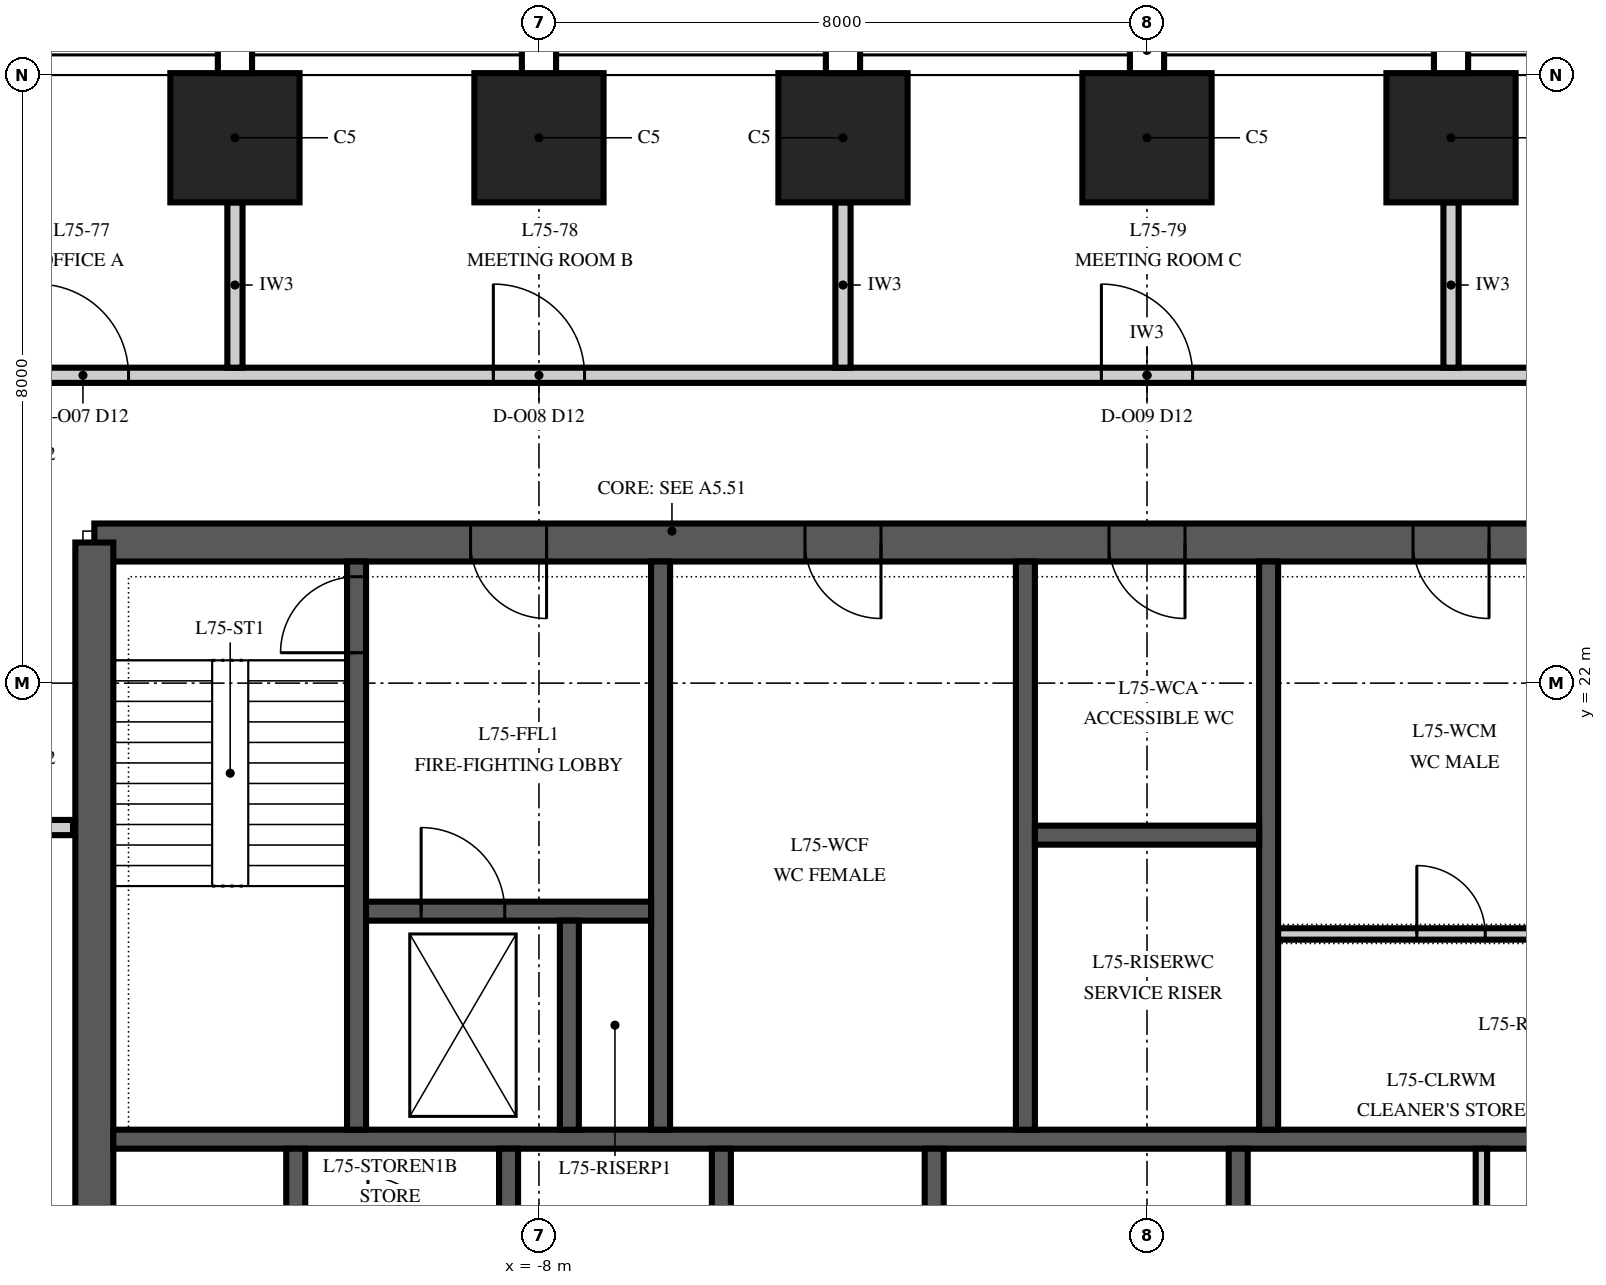
"""IFC4 building model, lengths in metres.
Left out: names, types, materials, properties, quantities, classifications, styles, units other than length and angle.
Written with IfcOpenShell. Run it as: python <this file> out.ifc"""

import sys

from ifc_helpers import new_model, si_unit, direction, frame, frame_2d, origin, origin_2d, place, context, subcontext, project, spatial, polyline, rectangle, outline, extrude, element, fill, save


model = new_model("IFC4")
c1 = context("Model", 3, precision=1e-05, world=origin(), true_north=direction((0.0, 1.0)))
c2 = subcontext(c1, "Body", "Model", "MODEL_VIEW")
j1 = project(units=[si_unit("LENGTHUNIT", "METRE"), si_unit("PLANEANGLEUNIT", "RADIAN")], contexts=[c1])
p1 = place(None, origin())
s1 = spatial("IfcSite", under=j1, at=p1, CompositionType="ELEMENT")
p2 = place(p1, origin())
s2 = spatial("IfcBuilding", under=s1, at=p2, CompositionType="ELEMENT")
p3 = place(p2, frame((0.0, 0.0, 320.0)))
s3 = spatial("IfcBuildingStorey", under=s2, at=p3, CompositionType="ELEMENT", Elevation=320.0)
for number, where, z_axis, x_axis in (
    (1, (4.0, 29.175, 0.0), (0.0, 0.0, 1.0), (-1.0, 0.0, 0.0)),
    (2, (0.0, 29.175, 0.0), (0.0, 0.0, 1.0), (-1.0, 0.0, 0.0)),
    (3, (-4.0, 29.175, 0.0), (0.0, 0.0, 1.0), (-1.0, 0.0, 0.0)),
    (4, (-8.0, 29.175, 0.0), (0.0, 0.0, 1.0), (-1.0, 0.0, 0.0)),
    (5, (-12.0, 29.175, 0.0), (0.0, 0.0, 1.0), (-1.0, 0.0, 0.0)),
):
    element("IfcColumn", number, at=place(p3, frame(where, z_axis=z_axis, x_axis=x_axis)), inside=s3, PredefinedType="COLUMN", context=c2, shape_type="SweptSolid", body=[
        extrude(rectangle(XDim=1.7, YDim=1.7, at=origin_2d()), origin(), (0.0, 0.0, 1.0), 4.0),
    ])
p4 = place(p3, frame((13.85, 23.85, 0.0), z_axis=(0.0, 0.0, 1.0), x_axis=(-1.0, 0.0, 0.0)))
e6 = element("IfcWall", 6, at=p4, inside=s3, PredefinedType="SHEAR", context=c2, shape_type="SweptSolid", body=[
    extrude(rectangle(XDim=27.7, YDim=0.5, at=frame_2d((13.85, 0.0))), origin(), (0.0, 0.0, 1.0), 4.0),
])
p5 = place(p4, frame((21.75, 0.0, 0.0)))
e7 = element("IfcOpeningElement", 7, at=p5, cuts=e6, PredefinedType="OPENING", context=c2, shape_type="SweptSolid", body=[
    extrude(rectangle(XDim=1.0, YDim=2.1, at=frame_2d((0.5, 1.05))), frame((0.0, 0.265, 0.0), z_axis=(0.0, -1.0, 0.0), x_axis=(1.0, 0.0, 0.0)), (0.0, 0.0, 1.0), 0.53),
])
p6 = place(p4, frame((4.95, 0.0, 0.0)))
e8 = element("IfcOpeningElement", 8, at=p6, cuts=e6, PredefinedType="OPENING", context=c2, shape_type="SweptSolid", body=[
    extrude(rectangle(XDim=1.0, YDim=2.1, at=frame_2d((0.5, 1.05))), frame((0.0, 0.265, 0.0), z_axis=(0.0, -1.0, 0.0), x_axis=(1.0, 0.0, 0.0)), (0.0, 0.0, 1.0), 0.53),
])
p7 = place(p4, frame((17.35, 0.0, 0.0)))
e9 = element("IfcOpeningElement", 9, at=p7, cuts=e6, PredefinedType="OPENING", context=c2, shape_type="SweptSolid", body=[
    extrude(rectangle(XDim=1.0, YDim=2.1, at=frame_2d((0.5, 1.05))), frame((0.0, 0.265, 0.0), z_axis=(0.0, -1.0, 0.0), x_axis=(1.0, 0.0, 0.0)), (0.0, 0.0, 1.0), 0.53),
])
p8 = place(p4, frame((13.35, 0.0, 0.0)))
e10 = element("IfcOpeningElement", 10, at=p8, cuts=e6, PredefinedType="OPENING", context=c2, shape_type="SweptSolid", body=[
    extrude(rectangle(XDim=1.0, YDim=2.1, at=frame_2d((0.5, 1.05))), frame((0.0, 0.265, 0.0), z_axis=(0.0, -1.0, 0.0), x_axis=(1.0, 0.0, 0.0)), (0.0, 0.0, 1.0), 0.53),
])
p9 = place(p4, frame((9.35, 0.0, 0.0)))
e11 = element("IfcOpeningElement", 11, at=p9, cuts=e6, PredefinedType="OPENING", context=c2, shape_type="SweptSolid", body=[
    extrude(rectangle(XDim=1.0, YDim=2.1, at=frame_2d((0.5, 1.05))), frame((0.0, 0.265, 0.0), z_axis=(0.0, -1.0, 0.0), x_axis=(1.0, 0.0, 0.0)), (0.0, 0.0, 1.0), 0.53),
])
p10 = place(p3, frame((-13.85, 23.85, 0.0), z_axis=(0.0, 0.0, 1.0), x_axis=(0.0, -1.0, 0.0)))
e12 = element("IfcWall", 12, at=p10, inside=s3, PredefinedType="SHEAR", context=c2, shape_type="SweptSolid", body=[
    extrude(outline(polyline([(0.0, -0.25), (17.7, -0.25), (17.7, 0.0), (17.45, 0.0), (17.45, 0.25), (0.25, 0.25), (0.25, 0.0), (0.0, 0.0), (0.0, -0.25)])), origin(), (0.0, 0.0, 1.0), 4.0),
])
p11 = place(p10, frame((11.75, 0.0, 0.0)))
e13 = element("IfcOpeningElement", 13, at=p11, cuts=e12, PredefinedType="OPENING", context=c2, shape_type="SweptSolid", body=[
    extrude(rectangle(XDim=1.8, YDim=2.4, at=frame_2d((0.9, 1.2))), frame((0.0, 0.265, 0.0), z_axis=(0.0, -1.0, 0.0), x_axis=(1.0, 0.0, 0.0)), (0.0, 0.0, 1.0), 0.53),
])
p12 = place(p3, frame((-13.6, 16.0, 0.0), z_axis=(0.0, 0.0, 1.0), x_axis=(1.0, 0.0, 0.0)))
e14 = element("IfcWall", 14, at=p12, inside=s3, PredefinedType="SHEAR", context=c2, shape_type="SweptSolid", body=[
    extrude(rectangle(XDim=27.2, YDim=0.25, at=frame_2d((13.6, 0.0))), origin(), (0.0, 0.0, 1.0), 4.0),
])
for number, where, z_axis, x_axis in (
    (15, (-11.2, 13.125, 0.0), (0.0, 0.0, 1.0), (0.0, 1.0, 0.0)),
    (16, (-8.4, 13.125, 0.0), (0.0, 0.0, 1.0), (0.0, 1.0, 0.0)),
    (17, (-5.6, 13.125, 0.0), (0.0, 0.0, 1.0), (0.0, 1.0, 0.0)),
    (18, (-2.8, 13.125, 0.0), (0.0, 0.0, 1.0), (0.0, 1.0, 0.0)),
    (19, (1.2, 13.125, 0.0), (0.0, 0.0, 1.0), (0.0, 1.0, 0.0)),
):
    element("IfcWall", number, at=place(p3, frame(where, z_axis=z_axis, x_axis=x_axis)), inside=s3, PredefinedType="SHEAR", context=c2, shape_type="SweptSolid", body=[
        extrude(rectangle(XDim=2.75, YDim=0.25, at=frame_2d((1.375, 0.0))), origin(), (0.0, 0.0, 1.0), 4.0),
    ])
p13 = place(p3, frame((-10.4, 16.125, 0.0), z_axis=(0.0, 0.0, 1.0), x_axis=(0.0, 1.0, 0.0)))
e20 = element("IfcWall", 20, at=p13, inside=s3, PredefinedType="SHEAR", context=c2, shape_type="SweptSolid", body=[
    extrude(rectangle(XDim=7.475, YDim=0.25, at=frame_2d((3.738, 0.0))), origin(), (0.0, 0.0, 1.0), 4.0),
])
p14 = place(p13, frame((6.275, 0.0, 0.0)))
e21 = element("IfcOpeningElement", 21, at=p14, cuts=e20, PredefinedType="OPENING", context=c2, shape_type="SweptSolid", body=[
    extrude(rectangle(XDim=1.0, YDim=2.1, at=frame_2d((0.5, 1.05))), frame((0.0, 0.14, 0.0), z_axis=(0.0, -1.0, 0.0), x_axis=(1.0, 0.0, 0.0)), (0.0, 0.0, 1.0), 0.28),
])
for number, where, z_axis, x_axis in (
    (22, (-6.4, 16.125, 0.0), (0.0, 0.0, 1.0), (0.0, 1.0, 0.0)),
    (23, (-1.6, 16.125, 0.0), (0.0, 0.0, 1.0), (0.0, 1.0, 0.0)),
    (24, (1.6, 16.125, 0.0), (0.0, 0.0, 1.0), (0.0, 1.0, 0.0)),
):
    element("IfcWall", number, at=place(p3, frame(where, z_axis=z_axis, x_axis=x_axis)), inside=s3, PredefinedType="SHEAR", context=c2, shape_type="SweptSolid", body=[
        extrude(rectangle(XDim=7.475, YDim=0.25, at=frame_2d((3.738, 0.0))), origin(), (0.0, 0.0, 1.0), 4.0),
    ])
p15 = place(p3, frame((-10.275, 19.0, 0.0), z_axis=(0.0, 0.0, 1.0), x_axis=(1.0, 0.0, 0.0)))
e25 = element("IfcWall", 25, at=p15, inside=s3, PredefinedType="SHEAR", context=c2, shape_type="SweptSolid", body=[
    extrude(rectangle(XDim=3.75, YDim=0.25, at=frame_2d((1.875, 0.0))), origin(), (0.0, 0.0, 1.0), 4.0),
])
p16 = place(p15, frame((0.725, 0.0, 0.0)))
e26 = element("IfcOpeningElement", 26, at=p16, cuts=e25, PredefinedType="OPENING", context=c2, shape_type="SweptSolid", body=[
    extrude(rectangle(XDim=1.1, YDim=2.1, at=frame_2d((0.55, 1.05))), frame((0.0, 0.14, 0.0), z_axis=(0.0, -1.0, 0.0), x_axis=(1.0, 0.0, 0.0)), (0.0, 0.0, 1.0), 0.28),
])
p17 = place(p3, frame((-7.6, 16.125, 0.0), z_axis=(0.0, 0.0, 1.0), x_axis=(0.0, 1.0, 0.0)))
e27 = element("IfcWall", 27, at=p17, inside=s3, PredefinedType="SHEAR", context=c2, shape_type="SweptSolid", body=[
    extrude(rectangle(XDim=2.75, YDim=0.25, at=frame_2d((1.375, 0.0))), origin(), (0.0, 0.0, 1.0), 4.0),
])
p18 = place(p3, frame((-1.475, 20.0, 0.0), z_axis=(0.0, 0.0, 1.0), x_axis=(1.0, 0.0, 0.0)))
e28 = element("IfcWall", 28, at=p18, inside=s3, PredefinedType="SHEAR", context=c2, shape_type="SweptSolid", body=[
    extrude(rectangle(XDim=2.95, YDim=0.25, at=frame_2d((1.475, 0.0))), origin(), (0.0, 0.0, 1.0), 4.0),
])
p19 = place(p3, frame((1.725, 18.7, 0.0), z_axis=(0.0, 0.0, 1.0), x_axis=(1.0, 0.0, 0.0)))
e29 = element("IfcWall", 29, at=p19, inside=s3, PredefinedType="PARTITIONING", context=c2, shape_type="SweptSolid", body=[
    extrude(rectangle(XDim=4.55, YDim=0.15, at=frame_2d((2.275, 0.0))), origin(), (0.0, 0.0, 1.0), 3.85),
])
p20 = place(p19, frame((1.825, 0.0, 0.0)))
e30 = element("IfcOpeningElement", 30, at=p20, cuts=e29, PredefinedType="OPENING", context=c2, shape_type="SweptSolid", body=[
    extrude(rectangle(XDim=0.9, YDim=2.1, at=frame_2d((0.45, 1.05))), frame((0.0, 0.09, 0.0), z_axis=(0.0, -1.0, 0.0), x_axis=(1.0, 0.0, 0.0)), (0.0, 0.0, 1.0), 0.18),
])
p21 = place(p3, frame((4.4, 13.125, 0.0), z_axis=(0.0, 0.0, 1.0), x_axis=(0.0, 1.0, 0.0)))
e31 = element("IfcWall", 31, at=p21, inside=s3, PredefinedType="PARTITIONING", context=c2, shape_type="SweptSolid", body=[
    extrude(rectangle(XDim=2.75, YDim=0.15, at=frame_2d((1.375, 0.0))), origin(), (0.0, 0.0, 1.0), 3.85),
])
p22 = place(p3, frame((-16.15, 20.1, 0.0), z_axis=(0.0, 0.0, 1.0), x_axis=(1.0, 0.0, 0.0)))
e32 = element("IfcWall", 32, at=p22, inside=s3, PredefinedType="PARTITIONING", context=c2, shape_type="SweptSolid", body=[
    extrude(rectangle(XDim=2.02, YDim=0.2, at=frame_2d((1.01, 0.0))), origin(), (0.0, 0.0, 1.0), 3.75),
])
p23 = place(p3, frame((-16.15, 26.05, 0.0), z_axis=(0.0, 0.0, 1.0), x_axis=(1.0, 0.0, 0.0)))
e33 = element("IfcWall", 33, at=p23, inside=s3, PredefinedType="PARTITIONING", context=c2, shape_type="SweptSolid", body=[
    extrude(rectangle(XDim=32.3, YDim=0.2, at=frame_2d((16.15, 0.0))), origin(), (0.0, 0.0, 1.0), 3.318),
])
p24 = place(p23, frame((1.55, 0.0, 0.0)))
e34 = element("IfcOpeningElement", 34, at=p24, cuts=e33, PredefinedType="OPENING", context=c2, shape_type="SweptSolid", body=[
    extrude(rectangle(XDim=1.2, YDim=2.4, at=frame_2d((0.6, 1.2))), frame((0.0, 0.115, 0.0), z_axis=(0.0, -1.0, 0.0), x_axis=(1.0, 0.0, 0.0)), (0.0, 0.0, 1.0), 0.23),
])
p25 = place(p23, frame((7.55, 0.0, 0.0)))
e35 = element("IfcOpeningElement", 35, at=p25, cuts=e33, PredefinedType="OPENING", context=c2, shape_type="SweptSolid", body=[
    extrude(rectangle(XDim=1.2, YDim=2.4, at=frame_2d((0.6, 1.2))), frame((0.0, 0.115, 0.0), z_axis=(0.0, -1.0, 0.0), x_axis=(1.0, 0.0, 0.0)), (0.0, 0.0, 1.0), 0.23),
])
p26 = place(p23, frame((15.55, 0.0, 0.0)))
e36 = element("IfcOpeningElement", 36, at=p26, cuts=e33, PredefinedType="OPENING", context=c2, shape_type="SweptSolid", body=[
    extrude(rectangle(XDim=1.2, YDim=2.4, at=frame_2d((0.6, 1.2))), frame((0.0, 0.115, 0.0), z_axis=(0.0, -1.0, 0.0), x_axis=(1.0, 0.0, 0.0)), (0.0, 0.0, 1.0), 0.23),
])
p27 = place(p23, frame((23.55, 0.0, 0.0)))
e37 = element("IfcOpeningElement", 37, at=p27, cuts=e33, PredefinedType="OPENING", context=c2, shape_type="SweptSolid", body=[
    extrude(rectangle(XDim=1.2, YDim=2.4, at=frame_2d((0.6, 1.2))), frame((0.0, 0.115, 0.0), z_axis=(0.0, -1.0, 0.0), x_axis=(1.0, 0.0, 0.0)), (0.0, 0.0, 1.0), 0.23),
])
p28 = place(p23, frame((29.55, 0.0, 0.0)))
e38 = element("IfcOpeningElement", 38, at=p28, cuts=e33, PredefinedType="OPENING", context=c2, shape_type="SweptSolid", body=[
    extrude(rectangle(XDim=1.2, YDim=2.4, at=frame_2d((0.6, 1.2))), frame((0.0, 0.115, 0.0), z_axis=(0.0, -1.0, 0.0), x_axis=(1.0, 0.0, 0.0)), (0.0, 0.0, 1.0), 0.23),
])
for number, where, z_axis, x_axis in (
    (39, (-12.0, 26.15, 0.0), (0.0, 0.0, 1.0), (0.0, 1.0, 0.0)),
    (40, (-4.0, 26.15, 0.0), (0.0, 0.0, 1.0), (0.0, 1.0, 0.0)),
    (41, (4.0, 26.15, 0.0), (0.0, 0.0, 1.0), (0.0, 1.0, 0.0)),
):
    element("IfcWall", number, at=place(p3, frame(where, z_axis=z_axis, x_axis=x_axis)), inside=s3, PredefinedType="PARTITIONING", context=c2, shape_type="SweptSolid", body=[
        extrude(rectangle(XDim=2.175, YDim=0.2, at=frame_2d((1.087, 0.0))), origin(), (0.0, 0.0, 1.0), 3.318),
    ])
p29 = place(p5, origin())
e42 = element("IfcDoor", 42, at=p29, inside=s3, OperationType="SINGLE_SWING_RIGHT", PredefinedType="DOOR", context=c2, shape_type="SweptSolid", body=[
    extrude(rectangle(XDim=1.0, YDim=2.1, at=frame_2d((0.5, 1.05))), frame((0.0, 0.25, 0.0), z_axis=(0.0, -1.0, 0.0), x_axis=(1.0, 0.0, 0.0)), (0.0, 0.0, 1.0), 0.5),
])
fill(e7, e42)
p30 = place(p7, origin())
e43 = element("IfcDoor", 43, at=p30, inside=s3, OperationType="SINGLE_SWING_LEFT", PredefinedType="DOOR", context=c2, shape_type="SweptSolid", body=[
    extrude(rectangle(XDim=1.0, YDim=2.1, at=frame_2d((0.5, 1.05))), frame((0.0, 0.25, 0.0), z_axis=(0.0, -1.0, 0.0), x_axis=(1.0, 0.0, 0.0)), (0.0, 0.0, 1.0), 0.5),
])
fill(e9, e43)
p31 = place(p8, origin())
e44 = element("IfcDoor", 44, at=p31, inside=s3, OperationType="SINGLE_SWING_LEFT", PredefinedType="DOOR", context=c2, shape_type="SweptSolid", body=[
    extrude(rectangle(XDim=1.0, YDim=2.1, at=frame_2d((0.5, 1.05))), frame((0.0, 0.25, 0.0), z_axis=(0.0, -1.0, 0.0), x_axis=(1.0, 0.0, 0.0)), (0.0, 0.0, 1.0), 0.5),
])
fill(e10, e44)
p32 = place(p9, origin())
e45 = element("IfcDoor", 45, at=p32, inside=s3, OperationType="SINGLE_SWING_LEFT", PredefinedType="DOOR", context=c2, shape_type="SweptSolid", body=[
    extrude(rectangle(XDim=1.0, YDim=2.1, at=frame_2d((0.5, 1.05))), frame((0.0, 0.25, 0.0), z_axis=(0.0, -1.0, 0.0), x_axis=(1.0, 0.0, 0.0)), (0.0, 0.0, 1.0), 0.5),
])
fill(e11, e45)
p33 = place(p14, origin())
e46 = element("IfcDoor", 46, at=p33, inside=s3, OperationType="SINGLE_SWING_LEFT", PredefinedType="DOOR", context=c2, shape_type="SweptSolid", body=[
    extrude(rectangle(XDim=1.0, YDim=2.1, at=frame_2d((0.5, 1.05))), frame((0.0, 0.125, 0.0), z_axis=(0.0, -1.0, 0.0), x_axis=(1.0, 0.0, 0.0)), (0.0, 0.0, 1.0), 0.25),
])
fill(e21, e46)
p34 = place(p16, origin())
e47 = element("IfcDoor", 47, at=p34, inside=s3, OperationType="SLIDING_TO_RIGHT", PredefinedType="DOOR", context=c2, shape_type="SweptSolid", body=[
    extrude(rectangle(XDim=1.1, YDim=2.1, at=frame_2d((0.55, 1.05))), frame((0.0, 0.125, 0.0), z_axis=(0.0, -1.0, 0.0), x_axis=(1.0, 0.0, 0.0)), (0.0, 0.0, 1.0), 0.25),
])
fill(e26, e47)
p35 = place(p20, origin())
e48 = element("IfcDoor", 48, at=p35, inside=s3, OperationType="SINGLE_SWING_LEFT", PredefinedType="DOOR", context=c2, shape_type="SweptSolid", body=[
    extrude(rectangle(XDim=0.9, YDim=2.1, at=frame_2d((0.45, 1.05))), frame((0.0, 0.075, 0.0), z_axis=(0.0, -1.0, 0.0), x_axis=(1.0, 0.0, 0.0)), (0.0, 0.0, 1.0), 0.149),
])
fill(e30, e48)
p36 = place(p24, origin())
e49 = element("IfcDoor", 49, at=p36, inside=s3, OperationType="SINGLE_SWING_LEFT", PredefinedType="DOOR", context=c2, shape_type="SweptSolid", body=[
    extrude(rectangle(XDim=1.2, YDim=2.4, at=frame_2d((0.6, 1.2))), frame((0.0, 0.1, 0.0), z_axis=(0.0, -1.0, 0.0), x_axis=(1.0, 0.0, 0.0)), (0.0, 0.0, 1.0), 0.199),
])
fill(e34, e49)
p37 = place(p25, origin())
e50 = element("IfcDoor", 50, at=p37, inside=s3, OperationType="SINGLE_SWING_LEFT", PredefinedType="DOOR", context=c2, shape_type="SweptSolid", body=[
    extrude(rectangle(XDim=1.2, YDim=2.4, at=frame_2d((0.6, 1.2))), frame((0.0, 0.1, 0.0), z_axis=(0.0, -1.0, 0.0), x_axis=(1.0, 0.0, 0.0)), (0.0, 0.0, 1.0), 0.199),
])
fill(e35, e50)
p38 = place(p26, origin())
e51 = element("IfcDoor", 51, at=p38, inside=s3, OperationType="SINGLE_SWING_LEFT", PredefinedType="DOOR", context=c2, shape_type="SweptSolid", body=[
    extrude(rectangle(XDim=1.2, YDim=2.4, at=frame_2d((0.6, 1.2))), frame((0.0, 0.1, 0.0), z_axis=(0.0, -1.0, 0.0), x_axis=(1.0, 0.0, 0.0)), (0.0, 0.0, 1.0), 0.199),
])
fill(e36, e51)
save(model, sys.argv[1])
